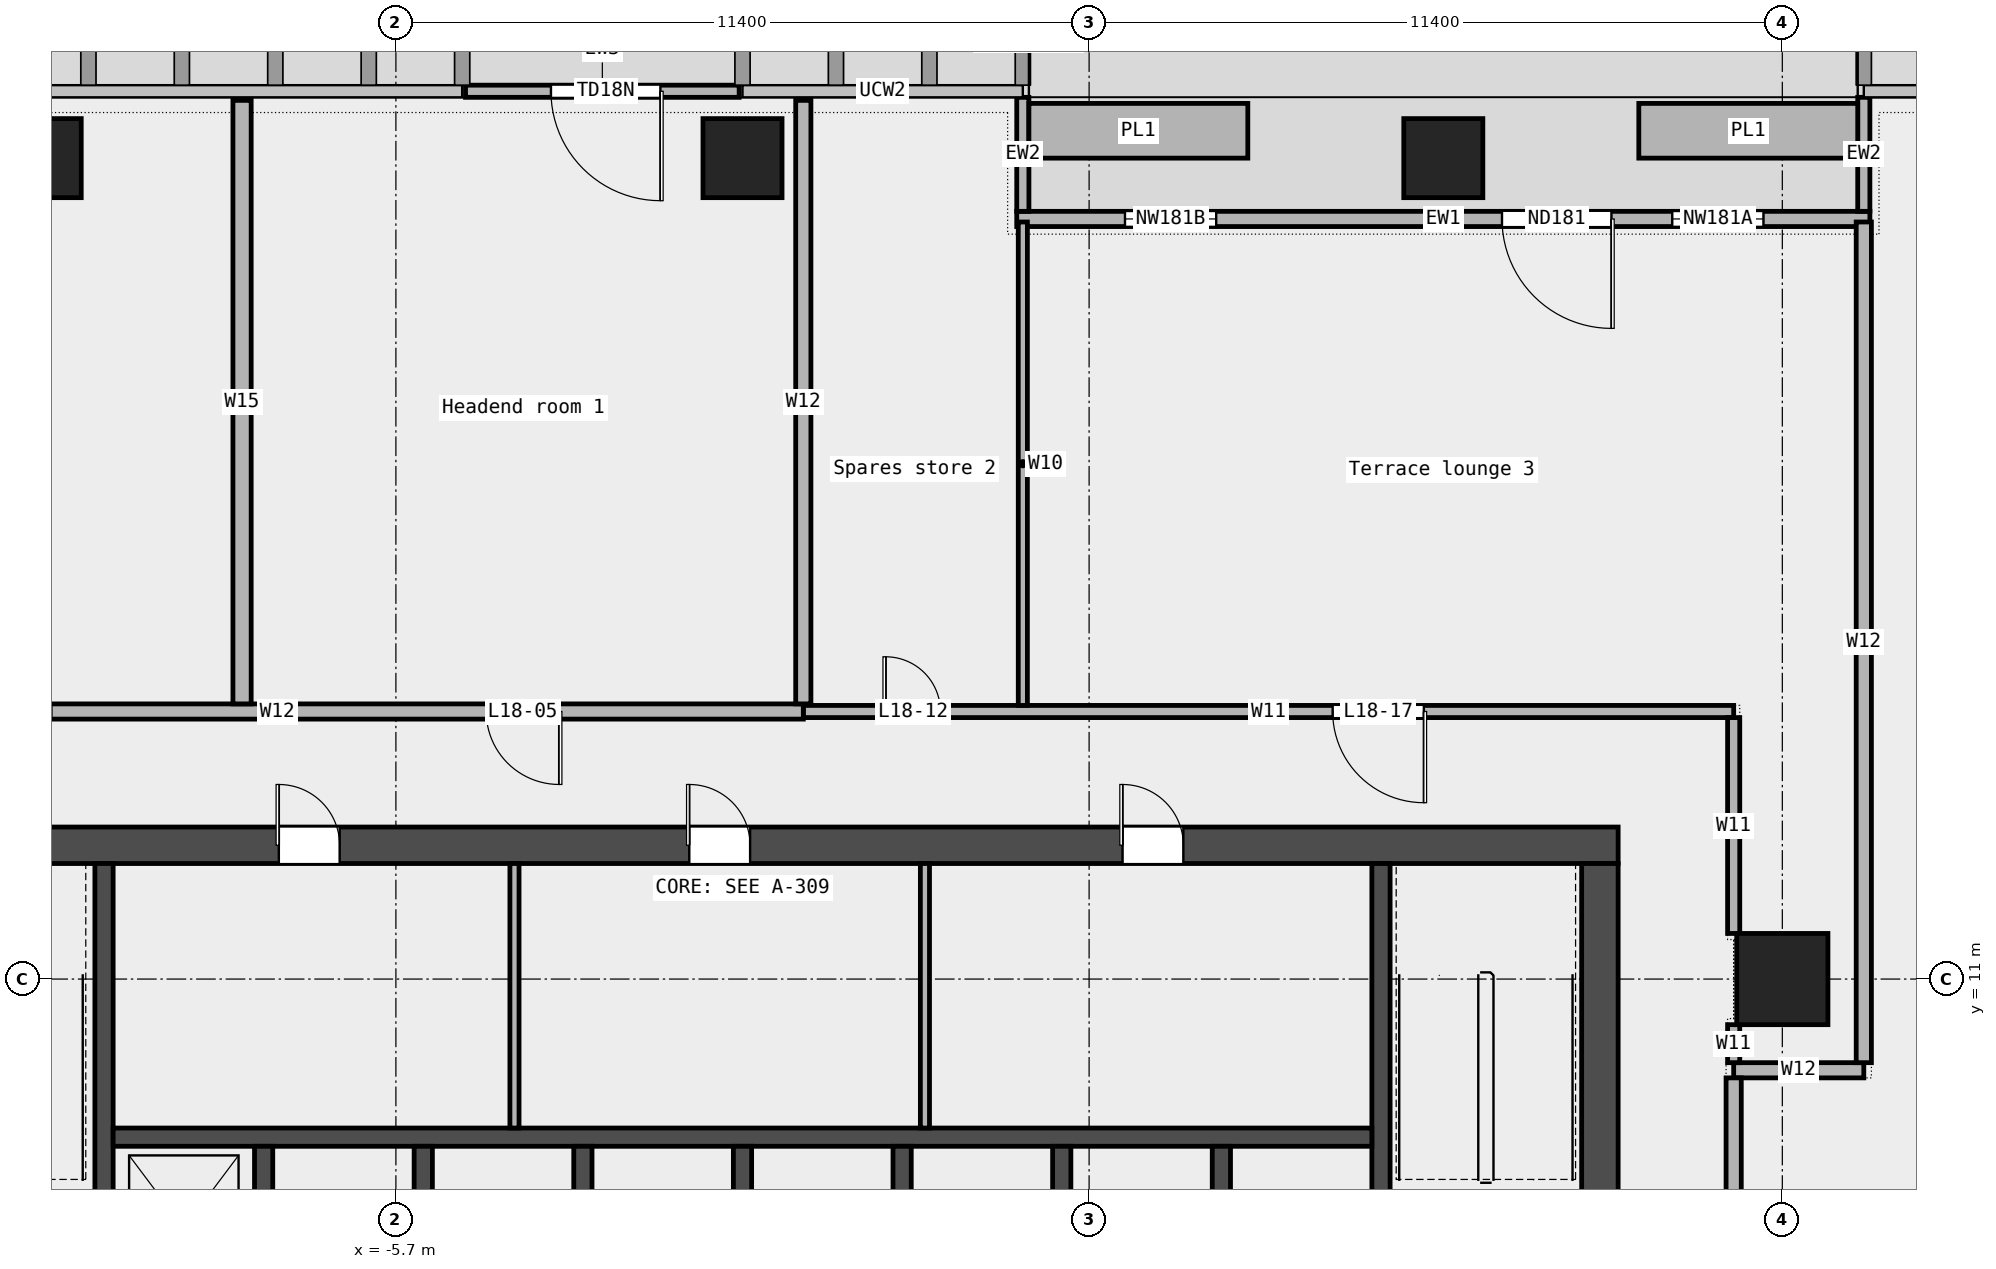
"""IFC4 building model, lengths in metres.
Left out: names, types, materials, properties, quantities, classifications, styles, units other than length and angle.
Written with IfcOpenShell. Run it as: python <this file> out.ifc"""

import sys

from ifc_helpers import new_model, si_unit, direction, frame, frame_2d, origin, origin_2d, place, context, subcontext, project, spatial, rectangle, extrude, element, fill, save


model = new_model("IFC4")
c1 = context("Model", 3, precision=1e-05, world=origin(), true_north=direction((0.0, 1.0)))
c2 = subcontext(c1, "Body", "Model", "MODEL_VIEW")
j1 = project(units=[si_unit("LENGTHUNIT", "METRE"), si_unit("PLANEANGLEUNIT", "RADIAN")], contexts=[c1])
p1 = place(None, origin())
s1 = spatial("IfcSite", under=j1, at=p1, CompositionType="ELEMENT")
p2 = place(p1, origin())
s2 = spatial("IfcBuilding", under=s1, at=p2, CompositionType="ELEMENT")
p3 = place(p2, frame((0.0, 0.0, 94.6)))
s3 = spatial("IfcBuildingStorey", under=s2, at=p3, CompositionType="ELEMENT", Elevation=94.6)
for number, where, z_axis, x_axis in (
    (1, (11.525, 24.5, 0.0), (0.0, 0.0, 1.0), (1.0, 0.0, 0.0)),
    (2, (0.0, 24.5, 0.0), (0.0, 0.0, 1.0), (1.0, 0.0, 0.0)),
    (3, (-11.525, 24.5, 0.0), (0.0, 0.0, 1.0), (1.0, 0.0, 0.0)),
):
    element("IfcColumn", number, at=place(p3, frame(where, z_axis=z_axis, x_axis=x_axis)), inside=s3, PredefinedType="COLUMN", context=c2, shape_type="SweptSolid", body=[
        extrude(rectangle(XDim=1.3, YDim=1.3, at=origin_2d()), origin(), (0.0, 0.0, 1.0), 4.05),
    ])
p4 = place(p3, frame((17.1, 11.0, 0.0), z_axis=(0.0, 0.0, 1.0), x_axis=(1.0, 0.0, 0.0)))
e4 = element("IfcColumn", 4, at=p4, inside=s3, PredefinedType="COLUMN", context=c2, shape_type="SweptSolid", body=[
    extrude(rectangle(XDim=1.5, YDim=1.5, at=origin_2d()), origin(), (0.0, 0.0, 1.0), 4.05),
])
p5 = place(p3, frame((18.54, 23.5, 0.0), z_axis=(0.0, 0.0, 1.0), x_axis=(-1.0, 0.0, 0.0)))
e5 = element("IfcWall", 5, at=p5, inside=s3, PredefinedType="STANDARD", context=c2, shape_type="SweptSolid", body=[
    extrude(rectangle(XDim=14.03, YDim=0.25, at=frame_2d((7.015, 0.0))), origin(), (0.0, 0.0, 1.0), 4.05),
])
p6 = place(p5, frame((1.75, 0.0, 0.45)))
e6 = element("IfcOpeningElement", 6, at=p6, cuts=e5, PredefinedType="OPENING", context=c2, shape_type="SweptSolid", body=[
    extrude(rectangle(XDim=1.5, YDim=3.0, at=frame_2d((0.75, 1.5))), frame((0.0, 0.137, 0.0), z_axis=(0.0, -1.0, 0.0), x_axis=(1.0, 0.0, 0.0)), (0.0, 0.0, 1.0), 0.274),
])
p7 = place(p5, frame((4.25, 0.0, 0.0)))
e7 = element("IfcOpeningElement", 7, at=p7, cuts=e5, PredefinedType="OPENING", context=c2, shape_type="SweptSolid", body=[
    extrude(rectangle(XDim=1.8, YDim=2.4, at=frame_2d((0.9, 1.2))), frame((0.0, 0.137, 0.0), z_axis=(0.0, -1.0, 0.0), x_axis=(1.0, 0.0, 0.0)), (0.0, 0.0, 1.0), 0.274),
])
p8 = place(p5, frame((10.75, 0.0, 0.45)))
e8 = element("IfcOpeningElement", 8, at=p8, cuts=e5, PredefinedType="OPENING", context=c2, shape_type="SweptSolid", body=[
    extrude(rectangle(XDim=1.5, YDim=3.0, at=frame_2d((0.75, 1.5))), frame((0.0, 0.137, 0.0), z_axis=(0.0, -1.0, 0.0), x_axis=(1.0, 0.0, 0.0)), (0.0, 0.0, 1.0), 0.274),
])
for number, where, z_axis, x_axis in (
    (9, (18.44, 25.5, 0.0), (0.0, 0.0, 1.0), (0.0, -1.0, 0.0)),
    (10, (4.61, 25.5, 0.0), (0.0, 0.0, 1.0), (0.0, -1.0, 0.0)),
):
    element("IfcWall", number, at=place(p3, frame(where, z_axis=z_axis, x_axis=x_axis)), inside=s3, PredefinedType="STANDARD", context=c2, shape_type="SweptSolid", body=[
        extrude(rectangle(XDim=1.875, YDim=0.2, at=frame_2d((0.938, 0.0))), origin(), (0.0, 0.0, 1.0), 4.05),
    ])
for number, where, z_axis, x_axis in (
    (11, (18.34, 24.95, 0.0), (0.0, 0.0, 1.0), (-1.0, 0.0, 0.0)),
    (12, (8.31, 24.95, 0.0), (0.0, 0.0, 1.0), (-1.0, 0.0, 0.0)),
):
    element("IfcWall", number, at=place(p3, frame(where, z_axis=z_axis, x_axis=x_axis)), inside=s3, PredefinedType="STANDARD", context=c2, shape_type="SweptSolid", body=[
        extrude(rectangle(XDim=3.6, YDim=0.9, at=frame_2d((1.8, 0.0))), origin(), (0.0, 0.0, 1.0), 0.7),
    ])
p9 = place(p3, frame((-0.055, 25.6, 0.0), z_axis=(0.0, 0.0, 1.0), x_axis=(-1.0, 0.0, 0.0)))
e13 = element("IfcWall", 13, at=p9, inside=s3, PredefinedType="STANDARD", context=c2, shape_type="SweptSolid", body=[
    extrude(rectangle(XDim=4.5, YDim=0.2, at=frame_2d((2.25, 0.0))), origin(), (0.0, 0.0, 1.0), 4.05),
])
p10 = place(p9, frame((1.295, 0.0, 0.0)))
e14 = element("IfcOpeningElement", 14, at=p10, cuts=e13, PredefinedType="OPENING", context=c2, shape_type="SweptSolid", body=[
    extrude(rectangle(XDim=1.8, YDim=2.4, at=frame_2d((0.9, 1.2))), frame((0.0, 0.112, 0.0), z_axis=(0.0, -1.0, 0.0), x_axis=(1.0, 0.0, 0.0)), (0.0, 0.0, 1.0), 0.224),
])
p11 = place(p3, frame((16.3, 9.5, 0.0), z_axis=(0.0, 0.0, 1.0), x_axis=(1.0, 0.0, 0.0)))
e15 = element("IfcWall", 15, at=p11, inside=s3, PredefinedType="PARTITIONING", context=c2, shape_type="SweptSolid", body=[
    extrude(rectangle(XDim=2.14, YDim=0.25, at=frame_2d((1.07, 0.0))), origin(), (0.0, 0.0, 1.0), 4.05),
])
p12 = place(p3, frame((1.0, 15.4, 0.0), z_axis=(0.0, 0.0, 1.0), x_axis=(1.0, 0.0, 0.0)))
e16 = element("IfcWall", 16, at=p12, inside=s3, PredefinedType="PARTITIONING", context=c2, shape_type="SweptSolid", body=[
    extrude(rectangle(XDim=15.3, YDim=0.2, at=frame_2d((7.65, 0.0))), origin(), (0.0, 0.0, 1.0), 4.05),
])
p13 = place(p12, frame((1.355, 0.0, 0.0)))
e17 = element("IfcOpeningElement", 17, at=p13, cuts=e16, PredefinedType="OPENING", context=c2, shape_type="SweptSolid", body=[
    extrude(rectangle(XDim=0.9, YDim=2.1, at=frame_2d((0.45, 1.05))), frame((0.0, 0.112, 0.0), z_axis=(0.0, -1.0, 0.0), x_axis=(1.0, 0.0, 0.0)), (0.0, 0.0, 1.0), 0.224),
])
p14 = place(p12, frame((8.705, 0.0, 0.0)))
e18 = element("IfcOpeningElement", 18, at=p14, cuts=e16, PredefinedType="OPENING", context=c2, shape_type="SweptSolid", body=[
    extrude(rectangle(XDim=1.5, YDim=2.1, at=frame_2d((0.75, 1.05))), frame((0.0, 0.112, 0.0), z_axis=(0.0, -1.0, 0.0), x_axis=(1.0, 0.0, 0.0)), (0.0, 0.0, 1.0), 0.224),
])
p15 = place(p3, frame((-16.3, 15.4, 0.0), z_axis=(0.0, 0.0, 1.0), x_axis=(1.0, 0.0, 0.0)))
e19 = element("IfcWall", 19, at=p15, inside=s3, PredefinedType="PARTITIONING", context=c2, shape_type="SweptSolid", body=[
    extrude(rectangle(XDim=17.3, YDim=0.25, at=frame_2d((8.65, 0.0))), origin(), (0.0, 0.0, 1.0), 4.05),
])
p16 = place(p15, frame((12.085, 0.0, 0.0)))
e20 = element("IfcOpeningElement", 20, at=p16, cuts=e19, PredefinedType="OPENING", context=c2, shape_type="SweptSolid", body=[
    extrude(rectangle(XDim=1.2, YDim=2.1, at=frame_2d((0.6, 1.05))), frame((0.0, 0.137, 0.0), z_axis=(0.0, -1.0, 0.0), x_axis=(1.0, 0.0, 0.0)), (0.0, 0.0, 1.0), 0.274),
])
p17 = place(p15, frame((3.135, 0.0, 0.0)))
e21 = element("IfcOpeningElement", 21, at=p17, cuts=e19, PredefinedType="OPENING", context=c2, shape_type="SweptSolid", body=[
    extrude(rectangle(XDim=1.8, YDim=2.1, at=frame_2d((0.9, 1.05))), frame((0.0, 0.137, 0.0), z_axis=(0.0, -1.0, 0.0), x_axis=(1.0, 0.0, 0.0)), (0.0, 0.0, 1.0), 0.274),
])
p18 = place(p3, frame((-8.23, 15.525, 0.0), z_axis=(0.0, 0.0, 1.0), x_axis=(0.0, 1.0, 0.0)))
e22 = element("IfcWall", 22, at=p18, inside=s3, PredefinedType="PARTITIONING", context=c2, shape_type="SweptSolid", body=[
    extrude(rectangle(XDim=9.925, YDim=0.3, at=frame_2d((4.962, 0.0))), origin(), (0.0, 0.0, 1.0), 4.05),
])
p19 = place(p3, frame((1.0, 15.525, 0.0), z_axis=(0.0, 0.0, 1.0), x_axis=(0.0, 1.0, 0.0)))
e23 = element("IfcWall", 23, at=p19, inside=s3, PredefinedType="PARTITIONING", context=c2, shape_type="SweptSolid", body=[
    extrude(rectangle(XDim=9.925, YDim=0.25, at=frame_2d((4.962, 0.0))), origin(), (0.0, 0.0, 1.0), 4.05),
])
p20 = place(p3, frame((4.61, 15.5, 0.0), z_axis=(0.0, 0.0, 1.0), x_axis=(0.0, 1.0, 0.0)))
e24 = element("IfcWall", 24, at=p20, inside=s3, PredefinedType="PARTITIONING", context=c2, shape_type="SweptSolid", body=[
    extrude(rectangle(XDim=7.95, YDim=0.15, at=frame_2d((3.975, 0.0))), origin(), (0.0, 0.0, 1.0), 4.05),
])
p21 = place(p3, frame((16.3, 9.625, 0.0), z_axis=(0.0, 0.0, 1.0), x_axis=(0.0, 1.0, 0.0)))
e25 = element("IfcWall", 25, at=p21, inside=s3, PredefinedType="PARTITIONING", context=c2, shape_type="SweptSolid", body=[
    extrude(rectangle(XDim=0.625, YDim=0.2, at=frame_2d((0.312, 0.0))), origin(), (0.0, 0.0, 1.0), 4.05),
])
p22 = place(p3, frame((16.3, 11.75, 0.0), z_axis=(0.0, 0.0, 1.0), x_axis=(0.0, 1.0, 0.0)))
e26 = element("IfcWall", 26, at=p22, inside=s3, PredefinedType="PARTITIONING", context=c2, shape_type="SweptSolid", body=[
    extrude(rectangle(XDim=3.55, YDim=0.2, at=frame_2d((1.775, 0.0))), origin(), (0.0, 0.0, 1.0), 4.05),
])
p23 = place(p3, frame((16.3, 1.525, 0.0), z_axis=(0.0, 0.0, 1.0), x_axis=(0.0, 1.0, 0.0)))
e27 = element("IfcWall", 27, at=p23, inside=s3, PredefinedType="PARTITIONING", context=c2, shape_type="SweptSolid", body=[
    extrude(rectangle(XDim=7.85, YDim=0.25, at=frame_2d((3.925, 0.0))), origin(), (0.0, 0.0, 1.0), 4.05),
])
p24 = place(p23, frame((2.538, 0.0, 0.0)))
e28 = element("IfcOpeningElement", 28, at=p24, cuts=e27, PredefinedType="OPENING", context=c2, shape_type="SweptSolid", body=[
    extrude(rectangle(XDim=1.8, YDim=2.1, at=frame_2d((0.9, 1.05))), frame((0.0, 0.137, 0.0), z_axis=(0.0, -1.0, 0.0), x_axis=(1.0, 0.0, 0.0)), (0.0, 0.0, 1.0), 0.274),
])
p25 = place(p3, frame((18.44, 9.625, 0.0), z_axis=(0.0, 0.0, 1.0), x_axis=(0.0, 1.0, 0.0)))
e29 = element("IfcWall", 29, at=p25, inside=s3, PredefinedType="PARTITIONING", context=c2, shape_type="SweptSolid", body=[
    extrude(rectangle(XDim=13.825, YDim=0.25, at=frame_2d((6.913, 0.0))), origin(), (0.0, 0.0, 1.0), 4.05),
])
p26 = place(p3, frame((-14.4, 13.2, 0.0), z_axis=(0.0, 0.0, 1.0), x_axis=(1.0, 0.0, 0.0)))
e30 = element("IfcWall", 30, at=p26, inside=s3, PredefinedType="SHEAR", context=c2, shape_type="SweptSolid", body=[
    extrude(rectangle(XDim=28.8, YDim=0.6, at=frame_2d((14.4, 0.0))), origin(), (0.0, 0.0, 1.0), 4.2),
])
p27 = place(p26, frame((6.775, 0.0, 0.0)))
e31 = element("IfcOpeningElement", 31, at=p27, cuts=e30, PredefinedType="OPENING", context=c2, shape_type="SweptSolid", body=[
    extrude(rectangle(XDim=1.0, YDim=2.1, at=frame_2d((0.5, 1.05))), frame((0.0, 0.312, 0.0), z_axis=(0.0, -1.0, 0.0), x_axis=(1.0, 0.0, 0.0)), (0.0, 0.0, 1.0), 0.624),
])
p28 = place(p26, frame((13.525, 0.0, 0.0)))
e32 = element("IfcOpeningElement", 32, at=p28, cuts=e30, PredefinedType="OPENING", context=c2, shape_type="SweptSolid", body=[
    extrude(rectangle(XDim=1.0, YDim=2.1, at=frame_2d((0.5, 1.05))), frame((0.0, 0.312, 0.0), z_axis=(0.0, -1.0, 0.0), x_axis=(1.0, 0.0, 0.0)), (0.0, 0.0, 1.0), 0.624),
])
p29 = place(p26, frame((20.65, 0.0, 0.0)))
e33 = element("IfcOpeningElement", 33, at=p29, cuts=e30, PredefinedType="OPENING", context=c2, shape_type="SweptSolid", body=[
    extrude(rectangle(XDim=1.0, YDim=2.1, at=frame_2d((0.5, 1.05))), frame((0.0, 0.312, 0.0), z_axis=(0.0, -1.0, 0.0), x_axis=(1.0, 0.0, 0.0)), (0.0, 0.0, 1.0), 0.624),
])
p30 = place(p3, frame((14.1, -6.6, 0.0), z_axis=(0.0, 0.0, 1.0), x_axis=(0.0, 1.0, 0.0)))
e34 = element("IfcWall", 34, at=p30, inside=s3, PredefinedType="SHEAR", context=c2, shape_type="SweptSolid", body=[
    extrude(rectangle(XDim=19.5, YDim=0.6, at=frame_2d((9.75, 0.0))), origin(), (0.0, 0.0, 1.0), 4.2),
])
p31 = place(p30, frame((9.3, 0.0, 0.0)))
e35 = element("IfcOpeningElement", 35, at=p31, cuts=e34, PredefinedType="OPENING", context=c2, shape_type="SweptSolid", body=[
    extrude(rectangle(XDim=1.8, YDim=2.1, at=frame_2d((0.9, 1.05))), frame((0.0, 0.312, 0.0), z_axis=(0.0, -1.0, 0.0), x_axis=(1.0, 0.0, 0.0)), (0.0, 0.0, 1.0), 0.624),
])
for number, where, z_axis, x_axis in (
    (36, (-10.5, 5.25, 0.0), (0.0, 0.0, 1.0), (0.0, 1.0, 0.0)),
    (37, (10.5, 5.25, 0.0), (0.0, 0.0, 1.0), (0.0, 1.0, 0.0)),
):
    element("IfcWall", number, at=place(p3, frame(where, z_axis=z_axis, x_axis=x_axis)), inside=s3, PredefinedType="SHEAR", context=c2, shape_type="SweptSolid", body=[
        extrude(rectangle(XDim=7.65, YDim=0.3, at=frame_2d((3.825, 0.0))), origin(), (0.0, 0.0, 1.0), 4.2),
    ])
p32 = place(p3, frame((-10.35, 8.4, 0.0), z_axis=(0.0, 0.0, 1.0), x_axis=(1.0, 0.0, 0.0)))
e38 = element("IfcWall", 38, at=p32, inside=s3, PredefinedType="SOLIDWALL", context=c2, shape_type="SweptSolid", body=[
    extrude(rectangle(XDim=20.7, YDim=0.3, at=frame_2d((10.35, 0.0))), origin(), (0.0, 0.0, 1.0), 4.2),
])
for number, where, z_axis, x_axis in (
    (39, (-7.875, 5.55, 0.0), (0.0, 0.0, 1.0), (0.0, 1.0, 0.0)),
    (40, (-5.25, 5.55, 0.0), (0.0, 0.0, 1.0), (0.0, 1.0, 0.0)),
    (41, (-2.625, 5.55, 0.0), (0.0, 0.0, 1.0), (0.0, 1.0, 0.0)),
    (42, (0.0, 5.55, 0.0), (0.0, 0.0, 1.0), (0.0, 1.0, 0.0)),
    (43, (2.625, 5.55, 0.0), (0.0, 0.0, 1.0), (0.0, 1.0, 0.0)),
    (44, (5.25, 5.55, 0.0), (0.0, 0.0, 1.0), (0.0, 1.0, 0.0)),
    (45, (7.875, 5.55, 0.0), (0.0, 0.0, 1.0), (0.0, 1.0, 0.0)),
):
    element("IfcWall", number, at=place(p3, frame(where, z_axis=z_axis, x_axis=x_axis)), inside=s3, PredefinedType="SOLIDWALL", context=c2, shape_type="SweptSolid", body=[
        extrude(rectangle(XDim=2.7, YDim=0.3, at=frame_2d((1.35, 0.0))), origin(), (0.0, 0.0, 1.0), 4.2),
    ])
for number, where, z_axis, x_axis in (
    (46, (-3.75, 8.55, 0.0), (0.0, 0.0, 1.0), (0.0, 1.0, 0.0)),
    (47, (3.0, 8.55, 0.0), (0.0, 0.0, 1.0), (0.0, 1.0, 0.0)),
):
    element("IfcWall", number, at=place(p3, frame(where, z_axis=z_axis, x_axis=x_axis)), inside=s3, PredefinedType="PARTITIONING", context=c2, shape_type="SweptSolid", body=[
        extrude(rectangle(XDim=4.35, YDim=0.15, at=frame_2d((2.175, 0.0))), origin(), (0.0, 0.0, 1.0), 4.2),
    ])
p33 = place(p6, origin())
e48 = element("IfcWindow", 48, at=p33, inside=s3, PartitioningType="SINGLE_PANEL", PredefinedType="WINDOW", context=c2, shape_type="SweptSolid", body=[
    extrude(rectangle(XDim=1.5, YDim=3.0, at=frame_2d((0.75, 1.5))), frame((0.0, 0.03, 0.0), z_axis=(0.0, -1.0, 0.0), x_axis=(1.0, 0.0, 0.0)), (0.0, 0.0, 1.0), 0.06),
])
fill(e6, e48)
p34 = place(p7, origin())
e49 = element("IfcDoor", 49, at=p34, inside=s3, OperationType="DOUBLE_DOOR_SINGLE_SWING", PredefinedType="DOOR", context=c2, shape_type="SweptSolid", body=[
    extrude(rectangle(XDim=1.8, YDim=2.4, at=frame_2d((0.9, 1.2))), frame((0.0, 0.025, 0.0), z_axis=(0.0, -1.0, 0.0), x_axis=(1.0, 0.0, 0.0)), (0.0, 0.0, 1.0), 0.05),
])
fill(e7, e49)
p35 = place(p8, origin())
e50 = element("IfcWindow", 50, at=p35, inside=s3, PartitioningType="SINGLE_PANEL", PredefinedType="WINDOW", context=c2, shape_type="SweptSolid", body=[
    extrude(rectangle(XDim=1.5, YDim=3.0, at=frame_2d((0.75, 1.5))), frame((0.0, 0.03, 0.0), z_axis=(0.0, -1.0, 0.0), x_axis=(1.0, 0.0, 0.0)), (0.0, 0.0, 1.0), 0.06),
])
fill(e8, e50)
p36 = place(p10, origin())
e51 = element("IfcDoor", 51, at=p36, inside=s3, OperationType="DOUBLE_DOOR_SINGLE_SWING", PredefinedType="DOOR", context=c2, shape_type="SweptSolid", body=[
    extrude(rectangle(XDim=1.8, YDim=2.4, at=frame_2d((0.9, 1.2))), frame((0.0, 0.025, 0.0), z_axis=(0.0, -1.0, 0.0), x_axis=(1.0, 0.0, 0.0)), (0.0, 0.0, 1.0), 0.05),
])
fill(e14, e51)
p37 = place(p16, origin())
e52 = element("IfcDoor", 52, at=p37, inside=s3, OperationType="SINGLE_SWING_LEFT", PredefinedType="DOOR", context=c2, shape_type="SweptSolid", body=[
    extrude(rectangle(XDim=1.2, YDim=2.1, at=frame_2d((0.6, 1.05))), frame((0.0, 0.025, 0.0), z_axis=(0.0, -1.0, 0.0), x_axis=(1.0, 0.0, 0.0)), (0.0, 0.0, 1.0), 0.05),
])
fill(e20, e52)
p38 = place(p13, origin())
e53 = element("IfcDoor", 53, at=p38, inside=s3, OperationType="SINGLE_SWING_LEFT", PredefinedType="DOOR", context=c2, shape_type="SweptSolid", body=[
    extrude(rectangle(XDim=0.9, YDim=2.1, at=frame_2d((0.45, 1.05))), frame((0.0, 0.025, 0.0), z_axis=(0.0, -1.0, 0.0), x_axis=(1.0, 0.0, 0.0)), (0.0, 0.0, 1.0), 0.05),
])
fill(e17, e53)
p39 = place(p14, origin())
e54 = element("IfcDoor", 54, at=p39, inside=s3, OperationType="DOUBLE_DOOR_SINGLE_SWING", PredefinedType="DOOR", context=c2, shape_type="SweptSolid", body=[
    extrude(rectangle(XDim=1.5, YDim=2.1, at=frame_2d((0.75, 1.05))), frame((0.0, 0.025, 0.0), z_axis=(0.0, -1.0, 0.0), x_axis=(1.0, 0.0, 0.0)), (0.0, 0.0, 1.0), 0.05),
])
fill(e18, e54)
p40 = place(p27, origin())
e55 = element("IfcDoor", 55, at=p40, inside=s3, OperationType="SINGLE_SWING_LEFT", PredefinedType="DOOR", context=c2, shape_type="SweptSolid", body=[
    extrude(rectangle(XDim=1.0, YDim=2.1, at=frame_2d((0.5, 1.05))), frame((0.0, 0.025, 0.0), z_axis=(0.0, -1.0, 0.0), x_axis=(1.0, 0.0, 0.0)), (0.0, 0.0, 1.0), 0.05),
])
fill(e31, e55)
p41 = place(p28, origin())
e56 = element("IfcDoor", 56, at=p41, inside=s3, OperationType="SINGLE_SWING_LEFT", PredefinedType="DOOR", context=c2, shape_type="SweptSolid", body=[
    extrude(rectangle(XDim=1.0, YDim=2.1, at=frame_2d((0.5, 1.05))), frame((0.0, 0.025, 0.0), z_axis=(0.0, -1.0, 0.0), x_axis=(1.0, 0.0, 0.0)), (0.0, 0.0, 1.0), 0.05),
])
fill(e32, e56)
p42 = place(p29, origin())
e57 = element("IfcDoor", 57, at=p42, inside=s3, OperationType="SINGLE_SWING_LEFT", PredefinedType="DOOR", context=c2, shape_type="SweptSolid", body=[
    extrude(rectangle(XDim=1.0, YDim=2.1, at=frame_2d((0.5, 1.05))), frame((0.0, 0.025, 0.0), z_axis=(0.0, -1.0, 0.0), x_axis=(1.0, 0.0, 0.0)), (0.0, 0.0, 1.0), 0.05),
])
fill(e33, e57)
save(model, sys.argv[1])
